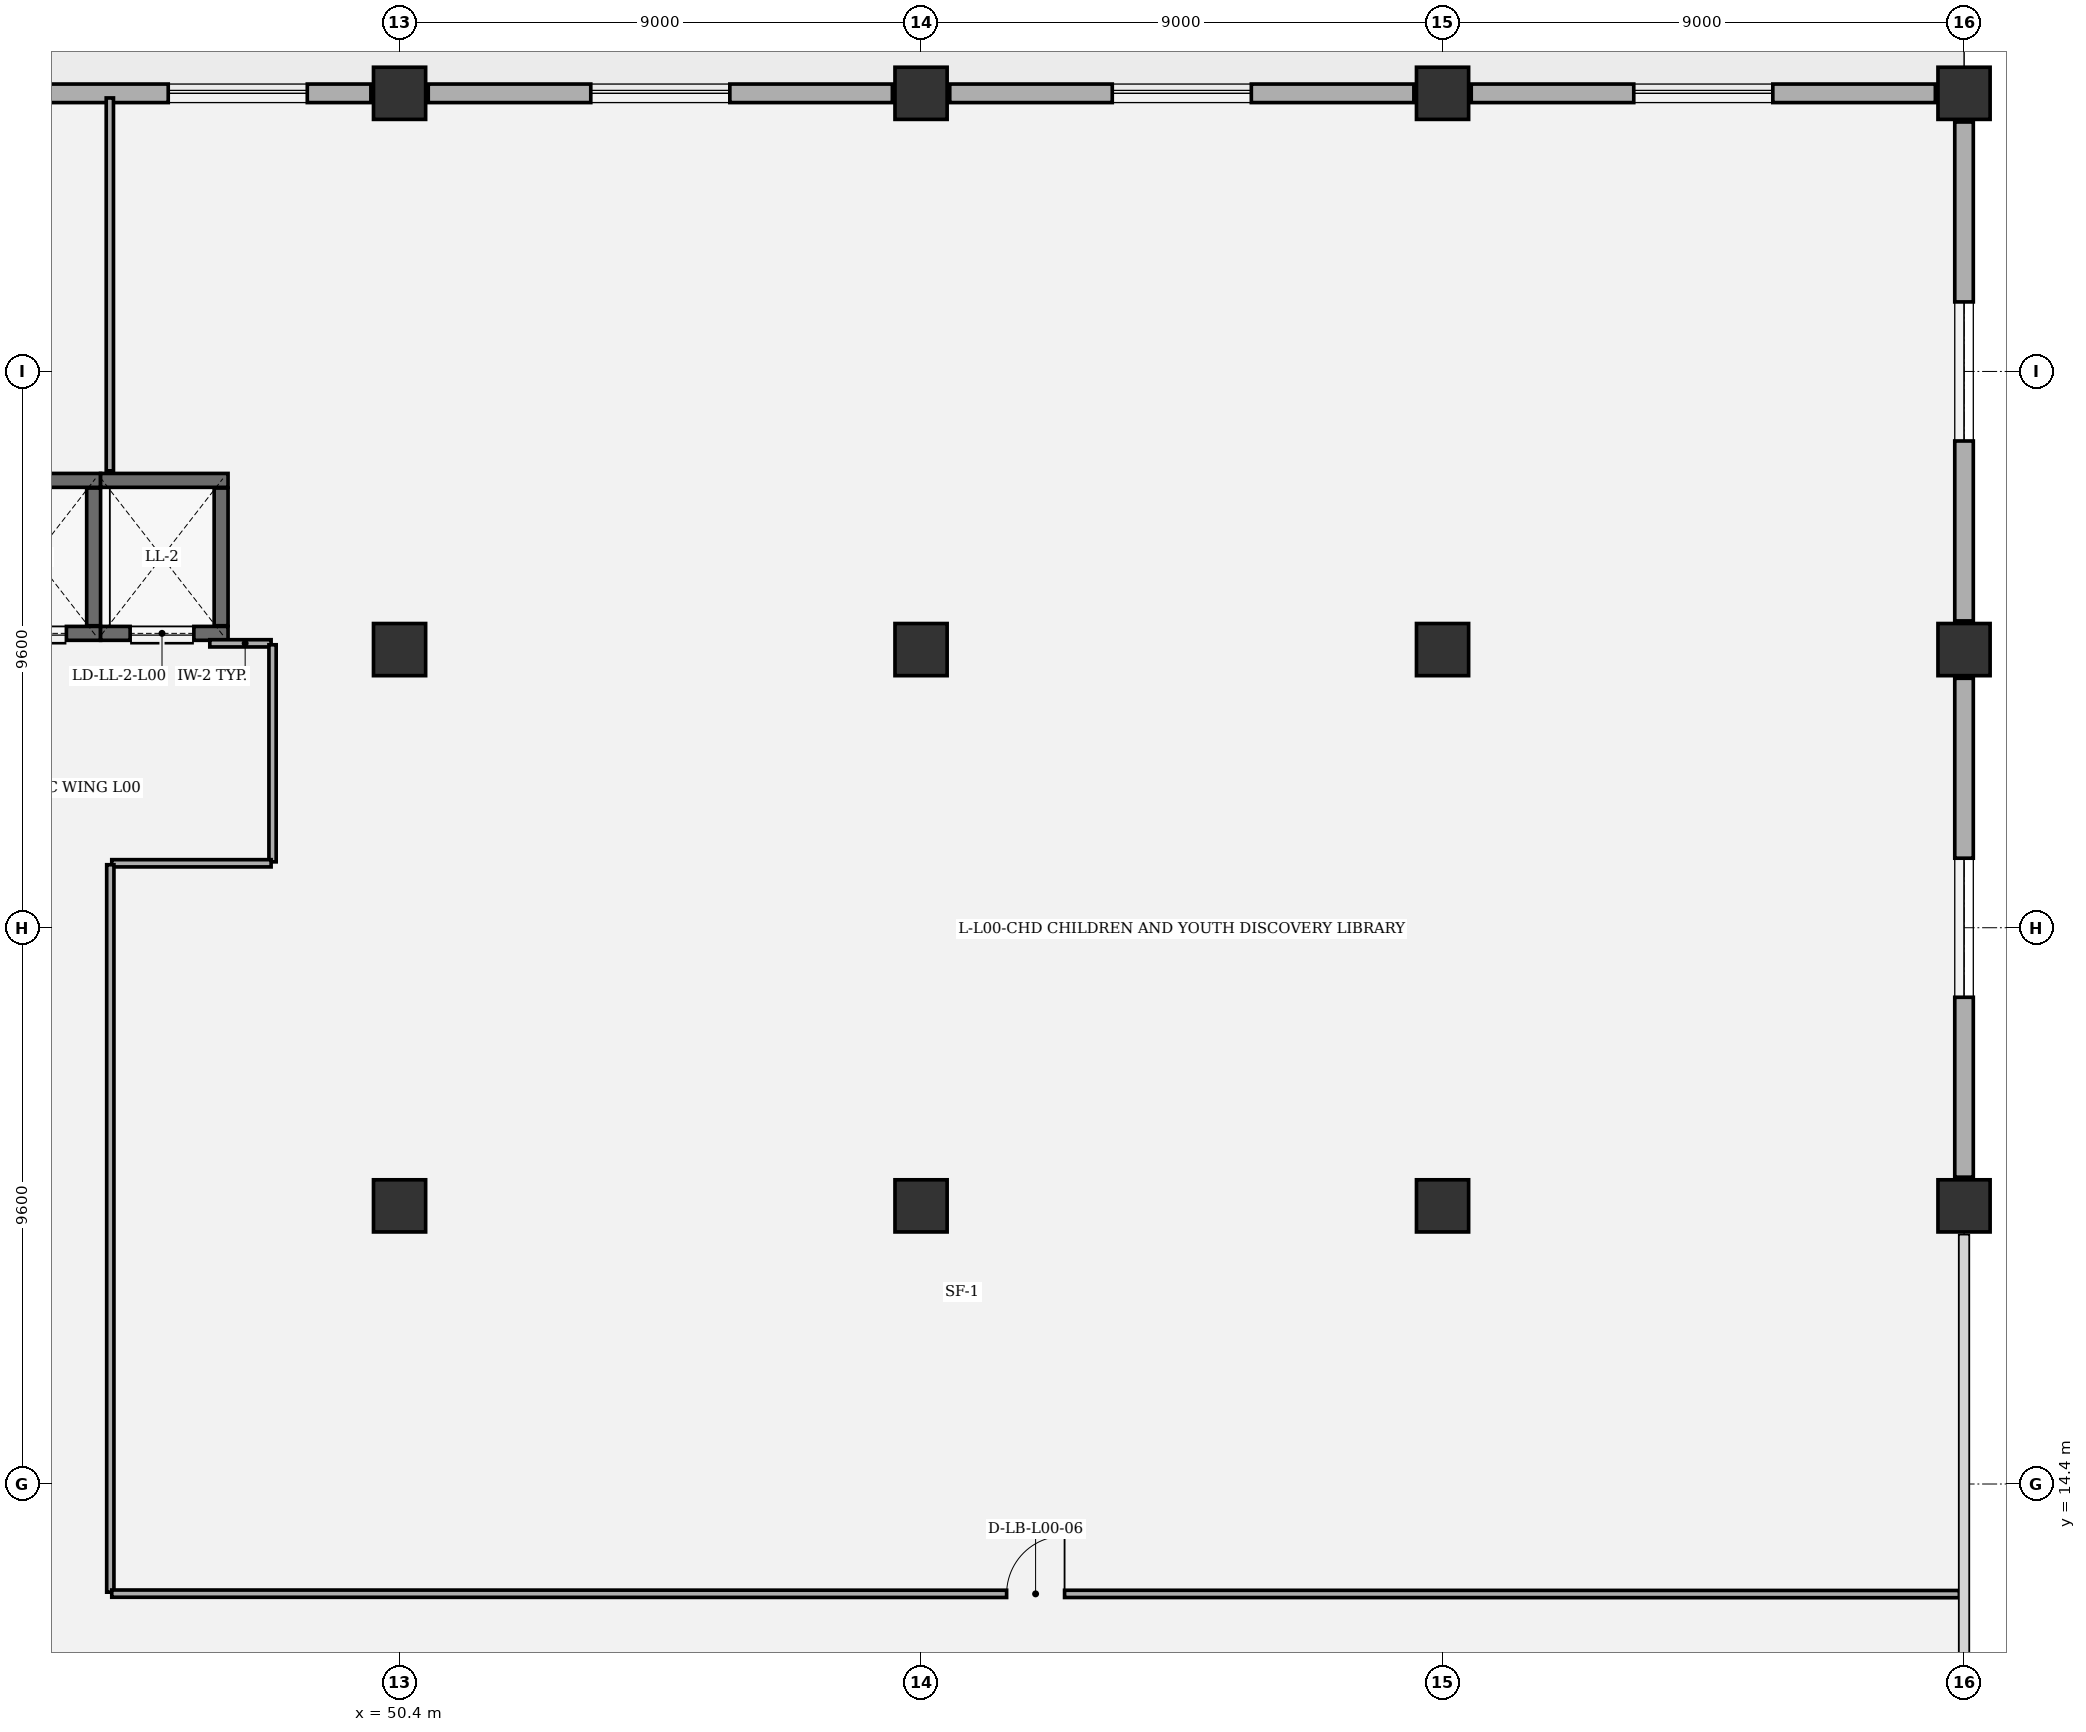
"""IFC4 building model, lengths in metres.
Left out: names, types, materials, properties, quantities, classifications, styles, units other than length and angle.
Written with IfcOpenShell. Run it as: python <this file> out.ifc"""

import sys

from ifc_helpers import new_model, si_unit, direction, frame, frame_2d, origin, origin_2d, place, context, subcontext, project, spatial, rectangle, extrude, element, fill, save


model = new_model("IFC4")
c1 = context("Model", 3, precision=1e-05, world=origin(), true_north=direction((0.0, 1.0)))
c2 = subcontext(c1, "Body", "Model", "MODEL_VIEW")
j1 = project(units=[si_unit("LENGTHUNIT", "METRE"), si_unit("PLANEANGLEUNIT", "RADIAN")], contexts=[c1])
p1 = place(None, origin())
s1 = spatial("IfcSite", under=j1, at=p1, CompositionType="ELEMENT")
p2 = place(p1, origin())
s2 = spatial("IfcBuilding", under=s1, at=p2, CompositionType="ELEMENT")
p3 = place(p2, origin())
s3 = spatial("IfcBuildingStorey", under=s2, at=p3, CompositionType="ELEMENT", Elevation=0.0)
for number, where, z_axis, x_axis in (
    (1, (50.4, 19.2, 0.0), (0.0, 0.0, 1.0), (1.0, 0.0, 0.0)),
    (2, (50.4, 28.8, 0.0), (0.0, 0.0, 1.0), (1.0, 0.0, 0.0)),
    (3, (50.4, 38.4, 0.0), (0.0, 0.0, 1.0), (1.0, 0.0, 0.0)),
    (4, (59.4, 19.2, 0.0), (0.0, 0.0, 1.0), (1.0, 0.0, 0.0)),
    (5, (59.4, 28.8, 0.0), (0.0, 0.0, 1.0), (1.0, 0.0, 0.0)),
    (6, (59.4, 38.4, 0.0), (0.0, 0.0, 1.0), (1.0, 0.0, 0.0)),
    (7, (68.4, 19.2, 0.0), (0.0, 0.0, 1.0), (1.0, 0.0, 0.0)),
    (8, (68.4, 28.8, 0.0), (0.0, 0.0, 1.0), (1.0, 0.0, 0.0)),
    (9, (68.4, 38.4, 0.0), (0.0, 0.0, 1.0), (1.0, 0.0, 0.0)),
    (10, (77.4, 19.2, 0.0), (0.0, 0.0, 1.0), (1.0, 0.0, 0.0)),
    (11, (77.4, 28.8, 0.0), (0.0, 0.0, 1.0), (1.0, 0.0, 0.0)),
    (12, (77.4, 38.4, 0.0), (0.0, 0.0, 1.0), (1.0, 0.0, 0.0)),
):
    element("IfcColumn", number, at=place(p3, frame(where, z_axis=z_axis, x_axis=x_axis)), inside=s3, PredefinedType="COLUMN", context=c2, shape_type="SweptSolid", body=[
        extrude(rectangle(XDim=0.9, YDim=0.9, at=origin_2d()), origin(), (0.0, 0.0, 1.0), 6.6),
    ])
p4 = place(p3, frame((77.4, 28.305, 0.0), z_axis=(0.0, 0.0, 1.0), x_axis=(0.0, -1.0, 0.0)))
e13 = element("IfcWall", 13, at=p4, inside=s3, PredefinedType="SOLIDWALL", context=c2, shape_type="SweptSolid", body=[
    extrude(rectangle(XDim=8.61, YDim=0.32, at=frame_2d((4.305, 0.0))), origin(), (0.0, 0.0, 1.0), 5.537),
])
p5 = place(p4, frame((3.105, 0.0, 0.8)))
e14 = element("IfcOpeningElement", 14, at=p5, cuts=e13, PredefinedType="OPENING", context=c2, shape_type="SweptSolid", body=[
    extrude(rectangle(XDim=2.4, YDim=1.65, at=frame_2d((1.2, 0.825))), frame((0.0, 0.17, 0.0), z_axis=(0.0, -1.0, 0.0), x_axis=(1.0, 0.0, 0.0)), (0.0, 0.0, 1.0), 0.34),
])
p6 = place(p3, frame((77.4, 37.905, 0.0), z_axis=(0.0, 0.0, 1.0), x_axis=(0.0, -1.0, 0.0)))
e15 = element("IfcWall", 15, at=p6, inside=s3, PredefinedType="SOLIDWALL", context=c2, shape_type="SweptSolid", body=[
    extrude(rectangle(XDim=8.61, YDim=0.32, at=frame_2d((4.305, 0.0))), origin(), (0.0, 0.0, 1.0), 5.537),
])
p7 = place(p6, frame((3.105, 0.0, 0.8)))
e16 = element("IfcOpeningElement", 16, at=p7, cuts=e15, PredefinedType="OPENING", context=c2, shape_type="SweptSolid", body=[
    extrude(rectangle(XDim=2.4, YDim=1.65, at=frame_2d((1.2, 0.825))), frame((0.0, 0.17, 0.0), z_axis=(0.0, -1.0, 0.0), x_axis=(1.0, 0.0, 0.0)), (0.0, 0.0, 1.0), 0.34),
])
p8 = place(p3, frame((68.895, 38.4, 0.0), z_axis=(0.0, 0.0, 1.0), x_axis=(1.0, 0.0, 0.0)))
e17 = element("IfcWall", 17, at=p8, inside=s3, PredefinedType="SOLIDWALL", context=c2, shape_type="SweptSolid", body=[
    extrude(rectangle(XDim=8.01, YDim=0.32, at=frame_2d((4.005, 0.0))), origin(), (0.0, 0.0, 1.0), 5.537),
])
p9 = place(p8, frame((2.805, 0.0, 0.8)))
e18 = element("IfcOpeningElement", 18, at=p9, cuts=e17, PredefinedType="OPENING", context=c2, shape_type="SweptSolid", body=[
    extrude(rectangle(XDim=2.4, YDim=1.65, at=frame_2d((1.2, 0.825))), frame((0.0, 0.17, 0.0), z_axis=(0.0, -1.0, 0.0), x_axis=(1.0, 0.0, 0.0)), (0.0, 0.0, 1.0), 0.34),
])
p10 = place(p3, frame((59.895, 38.4, 0.0), z_axis=(0.0, 0.0, 1.0), x_axis=(1.0, 0.0, 0.0)))
e19 = element("IfcWall", 19, at=p10, inside=s3, PredefinedType="SOLIDWALL", context=c2, shape_type="SweptSolid", body=[
    extrude(rectangle(XDim=8.01, YDim=0.32, at=frame_2d((4.005, 0.0))), origin(), (0.0, 0.0, 1.0), 5.537),
])
p11 = place(p10, frame((2.805, 0.0, 0.8)))
e20 = element("IfcOpeningElement", 20, at=p11, cuts=e19, PredefinedType="OPENING", context=c2, shape_type="SweptSolid", body=[
    extrude(rectangle(XDim=2.4, YDim=1.65, at=frame_2d((1.2, 0.825))), frame((0.0, 0.17, 0.0), z_axis=(0.0, -1.0, 0.0), x_axis=(1.0, 0.0, 0.0)), (0.0, 0.0, 1.0), 0.34),
])
p12 = place(p3, frame((50.895, 38.4, 0.0), z_axis=(0.0, 0.0, 1.0), x_axis=(1.0, 0.0, 0.0)))
e21 = element("IfcWall", 21, at=p12, inside=s3, PredefinedType="SOLIDWALL", context=c2, shape_type="SweptSolid", body=[
    extrude(rectangle(XDim=8.01, YDim=0.32, at=frame_2d((4.005, 0.0))), origin(), (0.0, 0.0, 1.0), 5.537),
])
p13 = place(p12, frame((2.805, 0.0, 0.8)))
e22 = element("IfcOpeningElement", 22, at=p13, cuts=e21, PredefinedType="OPENING", context=c2, shape_type="SweptSolid", body=[
    extrude(rectangle(XDim=2.4, YDim=1.65, at=frame_2d((1.2, 0.825))), frame((0.0, 0.17, 0.0), z_axis=(0.0, -1.0, 0.0), x_axis=(1.0, 0.0, 0.0)), (0.0, 0.0, 1.0), 0.34),
])
p14 = place(p3, frame((41.895, 38.4, 0.0), z_axis=(0.0, 0.0, 1.0), x_axis=(1.0, 0.0, 0.0)))
e23 = element("IfcWall", 23, at=p14, inside=s3, PredefinedType="SOLIDWALL", context=c2, shape_type="SweptSolid", body=[
    extrude(rectangle(XDim=8.01, YDim=0.32, at=frame_2d((4.005, 0.0))), origin(), (0.0, 0.0, 1.0), 5.537),
])
p15 = place(p14, frame((4.512, 0.0, 0.8)))
e24 = element("IfcOpeningElement", 24, at=p15, cuts=e23, PredefinedType="OPENING", context=c2, shape_type="SweptSolid", body=[
    extrude(rectangle(XDim=2.4, YDim=1.65, at=frame_2d((1.2, 0.825))), frame((0.0, 0.17, 0.0), z_axis=(0.0, -1.0, 0.0), x_axis=(1.0, 0.0, 0.0)), (0.0, 0.0, 1.0), 0.34),
])
p16 = place(p3, frame((45.24, 29.08, 0.0), z_axis=(0.0, 0.0, 1.0), x_axis=(-1.0, 0.0, 0.0)))
e25 = element("IfcWall", 25, at=p16, inside=s3, PredefinedType="SHEAR", context=c2, shape_type="SweptSolid", body=[
    extrude(rectangle(XDim=2.28, YDim=0.24, at=frame_2d((1.14, 0.0))), origin(), (0.0, 0.0, 1.0), 6.34),
])
p17 = place(p16, frame((0.59, 0.0, 0.0)))
e26 = element("IfcOpeningElement", 26, at=p17, cuts=e25, PredefinedType="OPENING", context=c2, shape_type="SweptSolid", body=[
    extrude(rectangle(XDim=1.1, YDim=2.2, at=frame_2d((0.55, 1.1))), frame((0.0, 0.13, 0.0), z_axis=(0.0, -1.0, 0.0), x_axis=(1.0, 0.0, 0.0)), (0.0, 0.0, 1.0), 0.26),
])
p18 = place(p3, frame((42.96, 31.72, 0.0), z_axis=(0.0, 0.0, 1.0), x_axis=(1.0, 0.0, 0.0)))
e27 = element("IfcWall", 27, at=p18, inside=s3, PredefinedType="SHEAR", context=c2, shape_type="SweptSolid", body=[
    extrude(rectangle(XDim=2.28, YDim=0.24, at=frame_2d((1.14, 0.0))), origin(), (0.0, 0.0, 1.0), 6.34),
])
p19 = place(p3, frame((45.12, 31.588, 0.0), z_axis=(0.0, 0.0, 1.0), x_axis=(0.0, -1.0, 0.0)))
e28 = element("IfcWall", 28, at=p19, inside=s3, PredefinedType="SHEAR", context=c2, shape_type="SweptSolid", body=[
    extrude(rectangle(XDim=2.376, YDim=0.24, at=frame_2d((1.188, 0.0))), origin(), (0.0, 0.0, 1.0), 6.34),
])
p20 = place(p3, frame((47.44, 29.08, 0.0), z_axis=(0.0, 0.0, 1.0), x_axis=(-1.0, 0.0, 0.0)))
e29 = element("IfcWall", 29, at=p20, inside=s3, PredefinedType="SHEAR", context=c2, shape_type="SweptSolid", body=[
    extrude(rectangle(XDim=2.2, YDim=0.24, at=frame_2d((1.1, 0.0))), origin(), (0.0, 0.0, 1.0), 6.34),
])
p21 = place(p20, frame((0.59, 0.0, 0.0)))
e30 = element("IfcOpeningElement", 30, at=p21, cuts=e29, PredefinedType="OPENING", context=c2, shape_type="SweptSolid", body=[
    extrude(rectangle(XDim=1.1, YDim=2.2, at=frame_2d((0.55, 1.1))), frame((0.0, 0.13, 0.0), z_axis=(0.0, -1.0, 0.0), x_axis=(1.0, 0.0, 0.0)), (0.0, 0.0, 1.0), 0.26),
])
p22 = place(p3, frame((45.24, 31.72, 0.0), z_axis=(0.0, 0.0, 1.0), x_axis=(1.0, 0.0, 0.0)))
e31 = element("IfcWall", 31, at=p22, inside=s3, PredefinedType="SHEAR", context=c2, shape_type="SweptSolid", body=[
    extrude(rectangle(XDim=2.2, YDim=0.24, at=frame_2d((1.1, 0.0))), origin(), (0.0, 0.0, 1.0), 6.34),
])
p23 = place(p3, frame((47.32, 31.588, 0.0), z_axis=(0.0, 0.0, 1.0), x_axis=(0.0, -1.0, 0.0)))
e32 = element("IfcWall", 32, at=p23, inside=s3, PredefinedType="SHEAR", context=c2, shape_type="SweptSolid", body=[
    extrude(rectangle(XDim=2.376, YDim=0.24, at=frame_2d((1.188, 0.0))), origin(), (0.0, 0.0, 1.0), 6.34),
])
p24 = place(p3, frame((48.183, 28.908, 0.0), z_axis=(0.0, 0.0, 1.0), x_axis=(-1.0, 0.0, 0.0)))
e33 = element("IfcWall", 33, at=p24, inside=s3, PredefinedType="PARTITIONING", context=c2, shape_type="SweptSolid", body=[
    extrude(rectangle(XDim=1.058, YDim=0.125, at=frame_2d((0.529, 0.0))), origin(), (0.0, 0.0, 1.0), 5.614),
])
p25 = place(p3, frame((48.208, 28.883, 0.0), z_axis=(0.0, 0.0, 1.0), x_axis=(0.0, -1.0, 0.0)))
e34 = element("IfcWall", 34, at=p25, inside=s3, PredefinedType="PARTITIONING", context=c2, shape_type="SweptSolid", body=[
    extrude(rectangle(XDim=3.746, YDim=0.125, at=frame_2d((1.873, 0.0))), origin(), (0.0, 0.0, 1.0), 6.34),
])
p26 = place(p3, frame((45.433, 25.112, 0.0), z_axis=(0.0, 0.0, 1.0), x_axis=(1.0, 0.0, 0.0)))
e35 = element("IfcWall", 35, at=p26, inside=s3, PredefinedType="PARTITIONING", context=c2, shape_type="SweptSolid", body=[
    extrude(rectangle(XDim=2.75, YDim=0.125, at=frame_2d((1.375, 0.0))), origin(), (0.0, 0.0, 1.0), 6.34),
])
p27 = place(p3, frame((45.408, 25.087, 0.0), z_axis=(0.0, 0.0, 1.0), x_axis=(0.0, -1.0, 0.0)))
e36 = element("IfcWall", 36, at=p27, inside=s3, PredefinedType="PARTITIONING", context=c2, shape_type="SweptSolid", body=[
    extrude(rectangle(XDim=12.554, YDim=0.125, at=frame_2d((6.277, 0.0))), origin(), (0.0, 0.0, 1.0), 6.34),
])
p28 = place(p3, frame((45.433, 12.508, 0.0), z_axis=(0.0, 0.0, 1.0), x_axis=(0.999999968081, -0.000252662519, 0.0)))
e37 = element("IfcWall", 37, at=p28, inside=s3, PredefinedType="PARTITIONING", context=c2, shape_type="SweptSolid", body=[
    extrude(rectangle(XDim=31.887, YDim=0.125, at=frame_2d((15.943, 0.0))), origin(), (0.0, 0.0, 1.0), 6.34),
])
p29 = place(p28, frame((15.444, 0.0, 0.0)))
e38 = element("IfcOpeningElement", 38, at=p29, cuts=e37, PredefinedType="OPENING", context=c2, shape_type="SweptSolid", body=[
    extrude(rectangle(XDim=1.0, YDim=2.15, at=frame_2d((0.5, 1.075))), frame((0.0, 0.073, 0.0), z_axis=(0.0, -1.0, 0.0), x_axis=(1.0, 0.0, 0.0)), (0.0, 0.0, 1.0), 0.145),
])
p30 = place(p3, frame((45.4, 38.32, 0.0), z_axis=(0.0, 0.0, 1.0), x_axis=(0.0, -1.0, 0.0)))
e39 = element("IfcWall", 39, at=p30, inside=s3, PredefinedType="PARTITIONING", context=c2, shape_type="SweptSolid", body=[
    extrude(rectangle(XDim=6.435, YDim=0.125, at=frame_2d((3.218, 0.0))), origin(), (0.0, 0.0, 1.0), 6.34),
])
p31 = place(p5, origin())
e40 = element("IfcWindow", 40, at=p31, inside=s3, PartitioningType="SINGLE_PANEL", PredefinedType="WINDOW", context=c2, shape_type="SweptSolid", body=[
    extrude(rectangle(XDim=2.4, YDim=1.65, at=frame_2d((1.2, 0.825))), frame((0.0, 0.03, 0.0), z_axis=(0.0, -1.0, 0.0), x_axis=(1.0, 0.0, 0.0)), (0.0, 0.0, 1.0), 0.06),
])
fill(e14, e40)
p32 = place(p7, origin())
e41 = element("IfcWindow", 41, at=p32, inside=s3, PartitioningType="SINGLE_PANEL", PredefinedType="WINDOW", context=c2, shape_type="SweptSolid", body=[
    extrude(rectangle(XDim=2.4, YDim=1.65, at=frame_2d((1.2, 0.825))), frame((0.0, 0.03, 0.0), z_axis=(0.0, -1.0, 0.0), x_axis=(1.0, 0.0, 0.0)), (0.0, 0.0, 1.0), 0.06),
])
fill(e16, e41)
p33 = place(p9, origin())
e42 = element("IfcWindow", 42, at=p33, inside=s3, PartitioningType="SINGLE_PANEL", PredefinedType="WINDOW", context=c2, shape_type="SweptSolid", body=[
    extrude(rectangle(XDim=2.4, YDim=1.65, at=frame_2d((1.2, 0.825))), frame((0.0, 0.03, 0.0), z_axis=(0.0, -1.0, 0.0), x_axis=(1.0, 0.0, 0.0)), (0.0, 0.0, 1.0), 0.06),
])
fill(e18, e42)
p34 = place(p11, origin())
e43 = element("IfcWindow", 43, at=p34, inside=s3, PartitioningType="SINGLE_PANEL", PredefinedType="WINDOW", context=c2, shape_type="SweptSolid", body=[
    extrude(rectangle(XDim=2.4, YDim=1.65, at=frame_2d((1.2, 0.825))), frame((0.0, 0.03, 0.0), z_axis=(0.0, -1.0, 0.0), x_axis=(1.0, 0.0, 0.0)), (0.0, 0.0, 1.0), 0.06),
])
fill(e20, e43)
p35 = place(p13, origin())
e44 = element("IfcWindow", 44, at=p35, inside=s3, PartitioningType="SINGLE_PANEL", PredefinedType="WINDOW", context=c2, shape_type="SweptSolid", body=[
    extrude(rectangle(XDim=2.4, YDim=1.65, at=frame_2d((1.2, 0.825))), frame((0.0, 0.03, 0.0), z_axis=(0.0, -1.0, 0.0), x_axis=(1.0, 0.0, 0.0)), (0.0, 0.0, 1.0), 0.06),
])
fill(e22, e44)
p36 = place(p15, origin())
e45 = element("IfcWindow", 45, at=p36, inside=s3, PartitioningType="SINGLE_PANEL", PredefinedType="WINDOW", context=c2, shape_type="SweptSolid", body=[
    extrude(rectangle(XDim=2.4, YDim=1.65, at=frame_2d((1.2, 0.825))), frame((0.0, 0.03, 0.0), z_axis=(0.0, -1.0, 0.0), x_axis=(1.0, 0.0, 0.0)), (0.0, 0.0, 1.0), 0.06),
])
fill(e24, e45)
p37 = place(p17, origin())
e46 = element("IfcDoor", 46, at=p37, inside=s3, OperationType="DOUBLE_DOOR_SLIDING", PredefinedType="DOOR", context=c2, shape_type="SweptSolid", body=[
    extrude(rectangle(XDim=1.1, YDim=2.2, at=frame_2d((0.55, 1.1))), frame((0.0, 0.025, 0.0), z_axis=(0.0, -1.0, 0.0), x_axis=(1.0, 0.0, 0.0)), (0.0, 0.0, 1.0), 0.05),
])
fill(e26, e46)
p38 = place(p21, origin())
e47 = element("IfcDoor", 47, at=p38, inside=s3, OperationType="DOUBLE_DOOR_SLIDING", PredefinedType="DOOR", context=c2, shape_type="SweptSolid", body=[
    extrude(rectangle(XDim=1.1, YDim=2.2, at=frame_2d((0.55, 1.1))), frame((0.0, 0.025, 0.0), z_axis=(0.0, -1.0, 0.0), x_axis=(1.0, 0.0, 0.0)), (0.0, 0.0, 1.0), 0.05),
])
fill(e30, e47)
p39 = place(p29, origin())
e48 = element("IfcDoor", 48, at=p39, inside=s3, OperationType="SINGLE_SWING_RIGHT", PredefinedType="DOOR", context=c2, shape_type="SweptSolid", body=[
    extrude(rectangle(XDim=1.0, YDim=2.15, at=frame_2d((0.5, 1.075))), frame((0.0, 0.025, 0.0), z_axis=(0.0, -1.0, 0.0), x_axis=(1.0, 0.0, 0.0)), (0.0, 0.0, 1.0), 0.05),
])
fill(e38, e48)
save(model, sys.argv[1])
